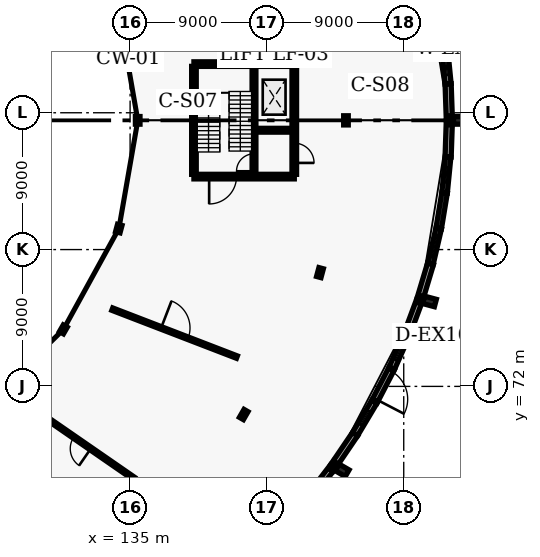
"""IFC4 building model, lengths in metres.
Left out: names, types, materials, properties, quantities, classifications, styles, units other than length and angle.
Written with IfcOpenShell. Run it as: python <this file> out.ifc"""

import sys

from ifc_helpers import new_model, si_unit, direction, frame, frame_2d, origin, origin_2d, place, context, subcontext, project, spatial, rectangle, i_section, extrude, element, fill, save


model = new_model("IFC4")
c1 = context("Model", 3, precision=1e-05, world=origin(), true_north=direction((0.0, 1.0)))
c2 = subcontext(c1, "Body", "Model", "MODEL_VIEW")
j1 = project(units=[si_unit("LENGTHUNIT", "METRE"), si_unit("PLANEANGLEUNIT", "RADIAN")], contexts=[c1])
p1 = place(None, origin())
s1 = spatial("IfcSite", under=j1, at=p1, CompositionType="ELEMENT")
p2 = place(p1, origin())
s2 = spatial("IfcBuilding", under=s1, at=p2, CompositionType="ELEMENT")
p3 = place(p2, origin())
s3 = spatial("IfcBuildingStorey", under=s2, at=p3, CompositionType="ELEMENT", Elevation=0.0)
p4 = place(p3, frame((135.5, 89.5, 0.0), z_axis=(0.0, 0.0, 1.0), x_axis=(1.0, 0.0, 0.0)))
e1 = element("IfcColumn", 1, at=p4, inside=s3, PredefinedType="COLUMN", context=c2, shape_type="SweptSolid", body=[
    extrude(i_section(OverallWidth=0.3, OverallDepth=0.5, WebThickness=0.014, FlangeThickness=0.028, FilletRadius=0.027, at=origin_2d()), origin(), (0.0, 0.0, 1.0), 5.4),
])
for number, where, z_axis, x_axis in (
    (2, (149.2, 89.5, 0.0), (0.0, 0.0, 1.0), (1.0, 0.0, 0.0)),
    (3, (156.0, 89.5, 0.0), (0.0, 0.0, 1.0), (1.0, 0.0, 0.0)),
):
    element("IfcColumn", number, at=place(p3, frame(where, z_axis=z_axis, x_axis=x_axis)), inside=s3, PredefinedType="COLUMN", context=c2, shape_type="SweptSolid", body=[
        extrude(i_section(OverallWidth=0.3, OverallDepth=0.6, WebThickness=0.015, FlangeThickness=0.03, FilletRadius=0.027, at=origin_2d()), origin(), (0.0, 0.0, 1.0), 5.4),
    ])
p5 = place(p3, frame((156.65, 89.5, 0.0), z_axis=(0.0, 0.0, 1.0), x_axis=(1.0, 0.0, 0.0)))
e4 = element("IfcColumn", 4, at=p5, inside=s3, PredefinedType="PILASTER", context=c2, shape_type="SweptSolid", body=[
    extrude(rectangle(XDim=0.75, YDim=0.5, at=origin_2d()), origin(), (0.0, 0.0, 1.0), 5.15),
])
p6 = place(p3, frame((130.61, 75.75, 0.0), z_axis=(0.0, 0.0, 1.0), x_axis=(0.866025403784, -0.5, 0.0)))
e5 = element("IfcColumn", 5, at=p6, inside=s3, PredefinedType="COLUMN", context=c2, shape_type="SweptSolid", body=[
    extrude(i_section(OverallWidth=0.3, OverallDepth=0.5, WebThickness=0.014, FlangeThickness=0.028, FilletRadius=0.027, at=origin_2d()), origin(), (0.0, 0.0, 1.0), 5.4),
])
for number, where, z_axis, x_axis in (
    (6, (142.474, 70.15, 0.0), (0.0, 0.0, 1.0), (0.866, -0.5, 0.0)),
    (7, (148.363, 66.75, 0.0), (0.0, 0.0, 1.0), (0.866, -0.5, 0.0)),
):
    element("IfcColumn", number, at=place(p3, frame(where, z_axis=z_axis, x_axis=x_axis)), inside=s3, PredefinedType="COLUMN", context=c2, shape_type="SweptSolid", body=[
        extrude(i_section(OverallWidth=0.3, OverallDepth=0.6, WebThickness=0.015, FlangeThickness=0.03, FilletRadius=0.027, at=origin_2d()), origin(), (0.0, 0.0, 1.0), 5.4),
    ])
p7 = place(p3, frame((148.953, 66.478, 0.0), z_axis=(0.0, 0.0, 1.0), x_axis=(0.866025403784, -0.5, 0.0)))
e8 = element("IfcColumn", 8, at=p7, inside=s3, PredefinedType="PILASTER", context=c2, shape_type="SweptSolid", body=[
    extrude(rectangle(XDim=0.75, YDim=0.5, at=origin_2d()), origin(), (0.0, 0.0, 1.0), 5.15),
])
p8 = place(p3, frame((134.256, 82.382, 0.0), z_axis=(0.0, 0.0, 1.0), x_axis=(0.965925826289, -0.258819045103, 0.0)))
e9 = element("IfcColumn", 9, at=p8, inside=s3, PredefinedType="COLUMN", context=c2, shape_type="SweptSolid", body=[
    extrude(i_section(OverallWidth=0.3, OverallDepth=0.5, WebThickness=0.014, FlangeThickness=0.028, FilletRadius=0.027, at=origin_2d()), origin(), (0.0, 0.0, 1.0), 5.4),
])
p9 = place(p3, frame((147.489, 79.484, 0.0), z_axis=(0.0, 0.0, 1.0), x_axis=(0.965925826289, -0.258819045103, 0.0)))
e10 = element("IfcColumn", 10, at=p9, inside=s3, PredefinedType="COLUMN", context=c2, shape_type="SweptSolid", body=[
    extrude(i_section(OverallWidth=0.3, OverallDepth=0.6, WebThickness=0.015, FlangeThickness=0.03, FilletRadius=0.027, at=origin_2d()), origin(), (0.0, 0.0, 1.0), 5.4),
])
p10 = place(p3, frame((154.058, 77.724, 0.0), z_axis=(0.0, 0.0, 1.0), x_axis=(0.965925826289, -0.258819045103, 0.0)))
e11 = element("IfcColumn", 11, at=p10, inside=s3, PredefinedType="COLUMN", context=c2, shape_type="SweptSolid", body=[
    extrude(i_section(OverallWidth=0.3, OverallDepth=0.5, WebThickness=0.014, FlangeThickness=0.028, FilletRadius=0.027, at=origin_2d()), origin(), (0.0, 0.0, 1.0), 5.4),
])
p11 = place(p3, frame((154.694, 77.588, 0.0), z_axis=(0.0, 0.0, 1.0), x_axis=(0.965925826289, -0.258819045103, 0.0)))
e12 = element("IfcColumn", 12, at=p11, inside=s3, PredefinedType="PILASTER", context=c2, shape_type="SweptSolid", body=[
    extrude(rectangle(XDim=0.8, YDim=0.5, at=origin_2d()), origin(), (0.0, 0.0, 1.0), 5.15),
])
p12 = place(p3, frame((156.0, 89.54, 0.0), z_axis=(0.0, 0.0, 1.0), x_axis=(-0.033840418878, 0.999427249003, 0.0)))
e13 = element("IfcWall", 13, at=p12, inside=s3, PredefinedType="SOLIDWALL", context=c2, shape_type="SweptSolid", body=[
    extrude(rectangle(XDim=2.366, YDim=0.4, at=frame_2d((1.183, 0.0))), origin(), (0.0, 0.0, 1.0), 4.6),
])
p13 = place(p3, frame((155.92, 91.905, 0.0), z_axis=(0.0, 0.0, 1.0), x_axis=(-0.0982595143, 0.995160825118, 0.0)))
e14 = element("IfcWall", 14, at=p13, inside=s3, PredefinedType="SOLIDWALL", context=c2, shape_type="SweptSolid", body=[
    extrude(rectangle(XDim=2.37, YDim=0.39, at=frame_2d((1.185, 0.0))), origin(), (0.0, 0.0, 1.0), 4.6),
])
p14 = place(p13, frame((0.585, 0.0, 0.95)))
e15 = element("IfcOpeningElement", 15, at=p14, cuts=e14, PredefinedType="OPENING", context=c2, shape_type="SweptSolid", body=[
    extrude(rectangle(XDim=1.2, YDim=1.8, at=frame_2d((0.6, 0.9))), frame((0.0, 0.205, 0.0), z_axis=(0.0, -1.0, 0.0), x_axis=(1.0, 0.0, 0.0)), (0.0, 0.0, 1.0), 0.41),
])
p15 = place(p3, frame((146.789, 64.701, 0.0), z_axis=(0.0, 0.0, 1.0), x_axis=(0.609808109702, 0.792549095856, 0.0)))
e16 = element("IfcWall", 16, at=p15, inside=s3, PredefinedType="SOLIDWALL", context=c2, shape_type="SweptSolid", body=[
    extrude(rectangle(XDim=2.545, YDim=0.4, at=frame_2d((1.272, 0.0))), origin(), (0.0, 0.0, 1.0), 4.6),
])
p16 = place(p3, frame((148.388, 66.783, 0.0), z_axis=(0.0, 0.0, 1.0), x_axis=(0.561757719856, 0.827301797521, 0.0)))
e17 = element("IfcWall", 17, at=p16, inside=s3, PredefinedType="SOLIDWALL", context=c2, shape_type="SweptSolid", body=[
    extrude(rectangle(XDim=2.515, YDim=0.4, at=frame_2d((1.258, 0.0))), origin(), (0.0, 0.0, 1.0), 4.6),
])
p17 = place(p3, frame((149.801, 68.864, 0.0), z_axis=(0.0, 0.0, 1.0), x_axis=(0.512344316931, 0.858780123727, 0.0)))
e18 = element("IfcWall", 18, at=p17, inside=s3, PredefinedType="SOLIDWALL", context=c2, shape_type="SweptSolid", body=[
    extrude(rectangle(XDim=2.488, YDim=0.39, at=frame_2d((1.244, 0.0))), origin(), (0.0, 0.0, 1.0), 4.6),
])
p18 = place(p17, frame((0.719, 0.0, 0.95)))
e19 = element("IfcOpeningElement", 19, at=p18, cuts=e18, PredefinedType="OPENING", context=c2, shape_type="SweptSolid", body=[
    extrude(rectangle(XDim=1.05, YDim=1.35, at=frame_2d((0.525, 0.675))), frame((0.0, 0.205, 0.0), z_axis=(0.0, -1.0, 0.0), x_axis=(1.0, 0.0, 0.0)), (0.0, 0.0, 1.0), 0.41),
])
p19 = place(p3, frame((151.076, 71.001, 0.0), z_axis=(0.0, 0.0, 1.0), x_axis=(0.460800257055, 0.88750387216, 0.0)))
e20 = element("IfcWall", 20, at=p19, inside=s3, PredefinedType="SOLIDWALL", context=c2, shape_type="SweptSolid", body=[
    extrude(rectangle(XDim=2.463, YDim=0.39, at=frame_2d((1.231, 0.0))), origin(), (0.0, 0.0, 1.0), 4.6),
])
p20 = place(p19, frame((0.182, 0.0, 0.0)))
e21 = element("IfcOpeningElement", 21, at=p20, cuts=e20, PredefinedType="OPENING", context=c2, shape_type="SweptSolid", body=[
    extrude(rectangle(XDim=2.1, YDim=2.35, at=frame_2d((1.05, 1.175))), frame((0.0, 0.205, 0.0), z_axis=(0.0, -1.0, 0.0), x_axis=(1.0, 0.0, 0.0)), (0.0, 0.0, 1.0), 0.41),
])
p21 = place(p3, frame((152.211, 73.187, 0.0), z_axis=(0.0, 0.0, 1.0), x_axis=(0.405609389351, 0.914046510453, 0.0)))
e22 = element("IfcWall", 22, at=p21, inside=s3, PredefinedType="SOLIDWALL", context=c2, shape_type="SweptSolid", body=[
    extrude(rectangle(XDim=2.441, YDim=0.39, at=frame_2d((1.22, 0.0))), origin(), (0.0, 0.0, 1.0), 4.6),
])
p22 = place(p21, frame((0.62, 0.0, 0.95)))
e23 = element("IfcOpeningElement", 23, at=p22, cuts=e22, PredefinedType="OPENING", context=c2, shape_type="SweptSolid", body=[
    extrude(rectangle(XDim=1.2, YDim=1.8, at=frame_2d((0.6, 0.9))), frame((0.0, 0.205, 0.0), z_axis=(0.0, -1.0, 0.0), x_axis=(1.0, 0.0, 0.0)), (0.0, 0.0, 1.0), 0.41),
])
p23 = place(p3, frame((153.201, 75.418, 0.0), z_axis=(0.0, 0.0, 1.0), x_axis=(0.348624527721, 0.937262470534, 0.0)))
e24 = element("IfcWall", 24, at=p23, inside=s3, PredefinedType="SOLIDWALL", context=c2, shape_type="SweptSolid", body=[
    extrude(rectangle(XDim=2.421, YDim=0.4, at=frame_2d((1.21, 0.0))), origin(), (0.0, 0.0, 1.0), 4.6),
])
p24 = place(p3, frame((154.071, 77.762, 0.0), z_axis=(0.0, 0.0, 1.0), x_axis=(0.287208023904, 0.95786823259, 0.0)))
e25 = element("IfcWall", 25, at=p24, inside=s3, PredefinedType="SOLIDWALL", context=c2, shape_type="SweptSolid", body=[
    extrude(rectangle(XDim=2.402, YDim=0.4, at=frame_2d((1.201, 0.0))), origin(), (0.0, 0.0, 1.0), 4.6),
])
p25 = place(p3, frame((154.761, 80.063, 0.0), z_axis=(0.0, 0.0, 1.0), x_axis=(0.225688046165, 0.974199623187, 0.0)))
e26 = element("IfcWall", 26, at=p25, inside=s3, PredefinedType="SOLIDWALL", context=c2, shape_type="SweptSolid", body=[
    extrude(rectangle(XDim=2.388, YDim=0.36, at=frame_2d((1.194, 0.0))), origin(), (0.0, 0.0, 1.0), 4.6),
])
p26 = place(p25, frame((0.444, 0.0, 0.95)))
e27 = element("IfcOpeningElement", 27, at=p26, cuts=e26, PredefinedType="OPENING", context=c2, shape_type="SweptSolid", body=[
    extrude(rectangle(XDim=1.5, YDim=2.1, at=frame_2d((0.75, 1.05))), frame((0.0, 0.19, 0.0), z_axis=(0.0, -1.0, 0.0), x_axis=(1.0, 0.0, 0.0)), (0.0, 0.0, 1.0), 0.38),
])
p27 = place(p3, frame((155.3, 82.39, 0.0), z_axis=(0.0, 0.0, 1.0), x_axis=(0.162733815116, 0.98667000837, 0.0)))
e28 = element("IfcWall", 28, at=p27, inside=s3, PredefinedType="SOLIDWALL", context=c2, shape_type="SweptSolid", body=[
    extrude(rectangle(XDim=2.378, YDim=0.36, at=frame_2d((1.189, 0.0))), origin(), (0.0, 0.0, 1.0), 4.6),
])
p28 = place(p3, frame((155.687, 84.736, 0.0), z_axis=(0.0, 0.0, 1.0), x_axis=(0.0982595143, 0.995160825118, 0.0)))
e29 = element("IfcWall", 29, at=p28, inside=s3, PredefinedType="SOLIDWALL", context=c2, shape_type="SweptSolid", body=[
    extrude(rectangle(XDim=2.37, YDim=0.36, at=frame_2d((1.185, 0.0))), origin(), (0.0, 0.0, 1.0), 4.6),
])
p29 = place(p28, frame((0.685, 0.0, 0.95)))
e30 = element("IfcOpeningElement", 30, at=p29, cuts=e29, PredefinedType="OPENING", context=c2, shape_type="SweptSolid", body=[
    extrude(rectangle(XDim=1.0, YDim=1.5, at=frame_2d((0.5, 0.75))), frame((0.0, 0.19, 0.0), z_axis=(0.0, -1.0, 0.0), x_axis=(1.0, 0.0, 0.0)), (0.0, 0.0, 1.0), 0.38),
])
p30 = place(p3, frame((155.92, 87.095, 0.0), z_axis=(0.0, 0.0, 1.0), x_axis=(0.033840418878, 0.999427249003, 0.0)))
e31 = element("IfcWall", 31, at=p30, inside=s3, PredefinedType="SOLIDWALL", context=c2, shape_type="SweptSolid", body=[
    extrude(rectangle(XDim=2.366, YDim=0.4, at=frame_2d((1.183, 0.0))), origin(), (0.0, 0.0, 1.0), 4.6),
])
p31 = place(p3, frame((139.2, 85.8, 0.0), z_axis=(0.0, 0.0, 1.0), x_axis=(1.0, 0.0, 0.0)))
e32 = element("IfcWall", 32, at=p31, inside=s3, PredefinedType="SHEAR", context=c2, shape_type="SweptSolid", body=[
    extrude(rectangle(XDim=6.6, YDim=0.3, at=frame_2d((3.3, 0.0))), origin(), (0.0, 0.0, 1.0), 5.4),
])
p32 = place(p31, frame((1.0, 0.0, 0.0)))
e33 = element("IfcOpeningElement", 33, at=p32, cuts=e32, PredefinedType="OPENING", context=c2, shape_type="SweptSolid", body=[
    extrude(rectangle(XDim=1.8, YDim=2.15, at=frame_2d((0.9, 1.075))), frame((0.0, 0.16, 0.0), z_axis=(0.0, -1.0, 0.0), x_axis=(1.0, 0.0, 0.0)), (0.0, 0.0, 1.0), 0.32),
])
p33 = place(p3, frame((139.2, 93.2, 0.0), z_axis=(0.0, 0.0, 1.0), x_axis=(1.0, 0.0, 0.0)))
e34 = element("IfcWall", 34, at=p33, inside=s3, PredefinedType="SHEAR", context=c2, shape_type="SweptSolid", body=[
    extrude(rectangle(XDim=6.6, YDim=0.3, at=frame_2d((3.3, 0.0))), origin(), (0.0, 0.0, 1.0), 5.4),
])
p34 = place(p3, frame((139.2, 85.95, 0.0), z_axis=(0.0, 0.0, 1.0), x_axis=(0.0, 1.0, 0.0)))
e35 = element("IfcWall", 35, at=p34, inside=s3, PredefinedType="SHEAR", context=c2, shape_type="SweptSolid", body=[
    extrude(rectangle(XDim=7.1, YDim=0.3, at=frame_2d((3.55, 0.0))), origin(), (0.0, 0.0, 1.0), 5.4),
])
p35 = place(p3, frame((145.8, 85.95, 0.0), z_axis=(0.0, 0.0, 1.0), x_axis=(0.0, 1.0, 0.0)))
e36 = element("IfcWall", 36, at=p35, inside=s3, PredefinedType="SHEAR", context=c2, shape_type="SweptSolid", body=[
    extrude(rectangle(XDim=7.1, YDim=0.3, at=frame_2d((3.55, 0.0))), origin(), (0.0, 0.0, 1.0), 5.4),
])
p36 = place(p35, frame((0.75, 0.0, 0.0)))
e37 = element("IfcOpeningElement", 37, at=p36, cuts=e36, PredefinedType="OPENING", context=c2, shape_type="SweptSolid", body=[
    extrude(rectangle(XDim=1.3, YDim=2.15, at=frame_2d((0.65, 1.075))), frame((0.0, 0.16, 0.0), z_axis=(0.0, -1.0, 0.0), x_axis=(1.0, 0.0, 0.0)), (0.0, 0.0, 1.0), 0.32),
])
p37 = place(p3, frame((143.15, 85.95, 0.0), z_axis=(0.0, 0.0, 1.0), x_axis=(0.0, 1.0, 0.0)))
e38 = element("IfcWall", 38, at=p37, inside=s3, PredefinedType="SHEAR", context=c2, shape_type="SweptSolid", body=[
    extrude(rectangle(XDim=7.1, YDim=0.25, at=frame_2d((3.55, 0.0))), origin(), (0.0, 0.0, 1.0), 5.4),
])
p38 = place(p37, frame((0.2, 0.0, 0.0)))
e39 = element("IfcOpeningElement", 39, at=p38, cuts=e38, PredefinedType="OPENING", context=c2, shape_type="SweptSolid", body=[
    extrude(rectangle(XDim=1.15, YDim=2.15, at=frame_2d((0.575, 1.075))), frame((0.0, 0.135, 0.0), z_axis=(0.0, -1.0, 0.0), x_axis=(1.0, 0.0, 0.0)), (0.0, 0.0, 1.0), 0.27),
])
p39 = place(p3, frame((143.27, 88.85, 0.0), z_axis=(0.0, 0.0, 1.0), x_axis=(1.0, 0.0, 0.0)))
e40 = element("IfcWall", 40, at=p39, inside=s3, PredefinedType="SHEAR", context=c2, shape_type="SweptSolid", body=[
    extrude(rectangle(XDim=2.38, YDim=0.25, at=frame_2d((1.19, 0.0))), origin(), (0.0, 0.0, 1.0), 5.4),
])
p40 = place(p39, frame((0.64, 0.0, 0.0)))
e41 = element("IfcOpeningElement", 41, at=p40, cuts=e40, PredefinedType="OPENING", context=c2, shape_type="SweptSolid", body=[
    extrude(rectangle(XDim=1.1, YDim=2.15, at=frame_2d((0.55, 1.075))), frame((0.0, 0.135, 0.0), z_axis=(0.0, -1.0, 0.0), x_axis=(1.0, 0.0, 0.0)), (0.0, 0.0, 1.0), 0.27),
])
p41 = place(p3, frame((128.475, 70.626, 0.0), z_axis=(0.0, 0.0, 1.0), x_axis=(0.822666462931, -0.568524309743, 0.0)))
e42 = element("IfcWall", 42, at=p41, inside=s3, PredefinedType="PARTITIONING", context=c2, shape_type="SweptSolid", body=[
    extrude(rectangle(XDim=8.223, YDim=0.18, at=frame_2d((4.112, 0.0))), origin(), (0.0, 0.0, 1.0), 4.3),
])
p42 = place(p41, frame((3.437, 0.0, 0.0)))
e43 = element("IfcOpeningElement", 43, at=p42, cuts=e42, PredefinedType="OPENING", context=c2, shape_type="SweptSolid", body=[
    extrude(rectangle(XDim=1.35, YDim=2.2, at=frame_2d((0.675, 1.1))), frame((0.0, 0.1, 0.0), z_axis=(0.0, -1.0, 0.0), x_axis=(1.0, 0.0, 0.0)), (0.0, 0.0, 1.0), 0.2),
])
p43 = place(p3, frame((133.83, 77.082, 0.0), z_axis=(0.0, 0.0, 1.0), x_axis=(0.933238808021, -0.359256631399, 0.0)))
e44 = element("IfcWall", 44, at=p43, inside=s3, PredefinedType="PARTITIONING", context=c2, shape_type="SweptSolid", body=[
    extrude(rectangle(XDim=8.782, YDim=0.165, at=frame_2d((4.391, 0.0))), origin(), (0.0, 0.0, 1.0), 4.3),
])
p44 = place(p43, frame((3.441, 0.0, 0.0)))
e45 = element("IfcOpeningElement", 45, at=p44, cuts=e44, PredefinedType="OPENING", context=c2, shape_type="SweptSolid", body=[
    extrude(rectangle(XDim=1.9, YDim=2.35, at=frame_2d((0.95, 1.175))), frame((0.0, 0.093, 0.0), z_axis=(0.0, -1.0, 0.0), x_axis=(1.0, 0.0, 0.0)), (0.0, 0.0, 1.0), 0.185),
])
p45 = place(p14, origin())
e46 = element("IfcWindow", 46, at=p45, inside=s3, PartitioningType="SINGLE_PANEL", PredefinedType="WINDOW", context=c2, shape_type="SweptSolid", body=[
    extrude(rectangle(XDim=1.2, YDim=1.8, at=frame_2d((0.6, 0.9))), frame((0.0, 0.03, 0.0), z_axis=(0.0, -1.0, 0.0), x_axis=(1.0, 0.0, 0.0)), (0.0, 0.0, 1.0), 0.06),
])
fill(e15, e46)
p46 = place(p18, origin())
e47 = element("IfcWindow", 47, at=p46, inside=s3, PartitioningType="SINGLE_PANEL", PredefinedType="WINDOW", context=c2, shape_type="SweptSolid", body=[
    extrude(rectangle(XDim=1.05, YDim=1.35, at=frame_2d((0.525, 0.675))), frame((0.0, 0.03, 0.0), z_axis=(0.0, -1.0, 0.0), x_axis=(1.0, 0.0, 0.0)), (0.0, 0.0, 1.0), 0.06),
])
fill(e19, e47)
p47 = place(p20, frame((2.1, 0.0, 0.0), z_axis=(0.0, 0.0, 1.0), x_axis=(-1.0, 0.0, 0.0)))
e48 = element("IfcDoor", 48, at=p47, inside=s3, OperationType="DOUBLE_DOOR_SINGLE_SWING", PredefinedType="DOOR", context=c2, shape_type="SweptSolid", body=[
    extrude(rectangle(XDim=2.1, YDim=2.35, at=frame_2d((1.05, 1.175))), frame((0.0, 0.025, 0.0), z_axis=(0.0, -1.0, 0.0), x_axis=(1.0, 0.0, 0.0)), (0.0, 0.0, 1.0), 0.05),
])
fill(e21, e48)
p48 = place(p22, origin())
e49 = element("IfcWindow", 49, at=p48, inside=s3, PartitioningType="SINGLE_PANEL", PredefinedType="WINDOW", context=c2, shape_type="SweptSolid", body=[
    extrude(rectangle(XDim=1.2, YDim=1.8, at=frame_2d((0.6, 0.9))), frame((0.0, 0.03, 0.0), z_axis=(0.0, -1.0, 0.0), x_axis=(1.0, 0.0, 0.0)), (0.0, 0.0, 1.0), 0.06),
])
fill(e23, e49)
p49 = place(p26, origin())
e50 = element("IfcWindow", 50, at=p49, inside=s3, PartitioningType="SINGLE_PANEL", PredefinedType="WINDOW", context=c2, shape_type="SweptSolid", body=[
    extrude(rectangle(XDim=1.5, YDim=2.1, at=frame_2d((0.75, 1.05))), frame((0.0, 0.03, 0.0), z_axis=(0.0, -1.0, 0.0), x_axis=(1.0, 0.0, 0.0)), (0.0, 0.0, 1.0), 0.06),
])
fill(e27, e50)
p50 = place(p29, origin())
e51 = element("IfcWindow", 51, at=p50, inside=s3, PartitioningType="SINGLE_PANEL", PredefinedType="WINDOW", context=c2, shape_type="SweptSolid", body=[
    extrude(rectangle(XDim=1.0, YDim=1.5, at=frame_2d((0.5, 0.75))), frame((0.0, 0.03, 0.0), z_axis=(0.0, -1.0, 0.0), x_axis=(1.0, 0.0, 0.0)), (0.0, 0.0, 1.0), 0.06),
])
fill(e30, e51)
p51 = place(p36, frame((1.3, 0.0, 0.0), z_axis=(0.0, 0.0, 1.0), x_axis=(-1.0, 0.0, 0.0)))
e52 = element("IfcDoor", 52, at=p51, inside=s3, OperationType="DOUBLE_DOOR_SINGLE_SWING", PredefinedType="DOOR", context=c2, shape_type="SweptSolid", body=[
    extrude(rectangle(XDim=1.3, YDim=2.15, at=frame_2d((0.65, 1.075))), frame((0.0, 0.025, 0.0), z_axis=(0.0, -1.0, 0.0), x_axis=(1.0, 0.0, 0.0)), (0.0, 0.0, 1.0), 0.05),
])
fill(e37, e52)
p52 = place(p38, origin())
e53 = element("IfcDoor", 53, at=p52, inside=s3, OperationType="SINGLE_SWING_LEFT", PredefinedType="DOOR", context=c2, shape_type="SweptSolid", body=[
    extrude(rectangle(XDim=1.15, YDim=2.15, at=frame_2d((0.575, 1.075))), frame((0.0, 0.025, 0.0), z_axis=(0.0, -1.0, 0.0), x_axis=(1.0, 0.0, 0.0)), (0.0, 0.0, 1.0), 0.05),
])
fill(e39, e53)
p53 = place(p32, frame((1.8, 0.0, 0.0), z_axis=(0.0, 0.0, 1.0), x_axis=(-1.0, 0.0, 0.0)))
e54 = element("IfcDoor", 54, at=p53, inside=s3, OperationType="DOUBLE_DOOR_SINGLE_SWING", PredefinedType="DOOR", context=c2, shape_type="SweptSolid", body=[
    extrude(rectangle(XDim=1.8, YDim=2.15, at=frame_2d((0.9, 1.075))), frame((0.0, 0.025, 0.0), z_axis=(0.0, -1.0, 0.0), x_axis=(1.0, 0.0, 0.0)), (0.0, 0.0, 1.0), 0.05),
])
fill(e33, e54)
p54 = place(p40, origin())
e55 = element("IfcDoor", 55, at=p54, inside=s3, OperationType="SLIDING_TO_LEFT", PredefinedType="DOOR", context=c2, shape_type="SweptSolid", body=[
    extrude(rectangle(XDim=1.1, YDim=2.15, at=frame_2d((0.55, 1.075))), frame((0.0, 0.025, 0.0), z_axis=(0.0, -1.0, 0.0), x_axis=(1.0, 0.0, 0.0)), (0.0, 0.0, 1.0), 0.05),
])
fill(e41, e55)
p55 = place(p42, origin())
e56 = element("IfcDoor", 56, at=p55, inside=s3, OperationType="SINGLE_SWING_RIGHT", PredefinedType="DOOR", context=c2, shape_type="SweptSolid", body=[
    extrude(rectangle(XDim=1.35, YDim=2.2, at=frame_2d((0.675, 1.1))), frame((0.0, 0.025, 0.0), z_axis=(0.0, -1.0, 0.0), x_axis=(1.0, 0.0, 0.0)), (0.0, 0.0, 1.0), 0.05),
])
fill(e43, e56)
p56 = place(p44, origin())
e57 = element("IfcDoor", 57, at=p56, inside=s3, OperationType="DOUBLE_DOOR_SINGLE_SWING", PredefinedType="DOOR", context=c2, shape_type="SweptSolid", body=[
    extrude(rectangle(XDim=1.9, YDim=2.35, at=frame_2d((0.95, 1.175))), frame((0.0, 0.025, 0.0), z_axis=(0.0, -1.0, 0.0), x_axis=(1.0, 0.0, 0.0)), (0.0, 0.0, 1.0), 0.05),
])
fill(e45, e57)
save(model, sys.argv[1])
